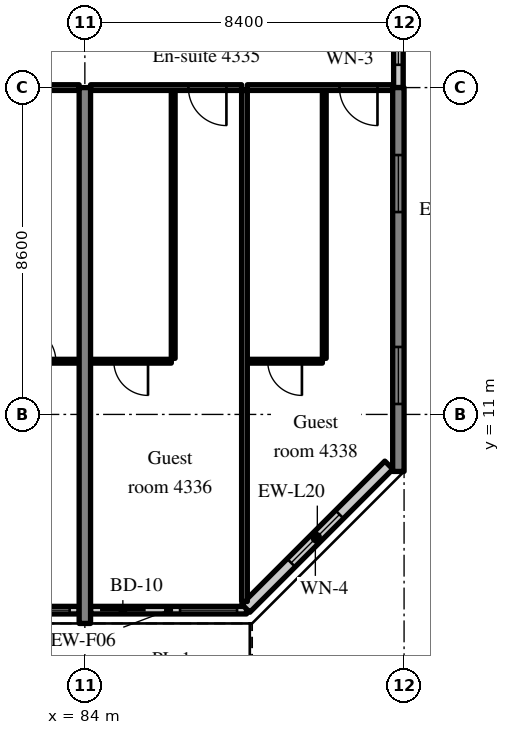
"""IFC4 building model, lengths in metres.
Left out: names, types, materials, properties, quantities, classifications, styles, units other than length and angle.
Written with IfcOpenShell. Run it as: python <this file> out.ifc"""

import sys

from ifc_helpers import new_model, si_unit, direction, frame, frame_2d, origin, place, context, subcontext, project, spatial, rectangle, extrude, source, transform, mapped, element, fill, save


model = new_model("IFC4")
c1 = context("Model", 3, precision=1e-05, world=origin(), true_north=direction((0.0, 1.0)))
c2 = subcontext(c1, "Body", "Model", "MODEL_VIEW")
j1 = project(units=[si_unit("LENGTHUNIT", "METRE"), si_unit("PLANEANGLEUNIT", "RADIAN")], contexts=[c1])
p1 = place(None, origin())
s1 = spatial("IfcSite", under=j1, at=p1, CompositionType="ELEMENT")
p2 = place(p1, origin())
s2 = spatial("IfcBuilding", under=s1, at=p2, CompositionType="ELEMENT")
p3 = place(p2, frame((0.0, 0.0, 178.2)))
s3 = spatial("IfcBuildingStorey", under=s2, at=p3, CompositionType="ELEMENT", Elevation=178.2)
m1 = source(origin(), c2, "Body", "SweptSolid", [
    extrude(rectangle(XDim=14.1, YDim=0.3, at=frame_2d((7.05, 0.0))), origin(), (0.0, 0.0, 1.0), 3.52),
])
p4 = place(p3, frame((84.0, 5.5, 0.0), z_axis=(0.0, 0.0, 1.0), x_axis=(0.0, 1.0, 0.0)))
e1 = element("IfcWall", 1, at=p4, inside=s3, PredefinedType="SHEAR", context=c2, shape_type="MappedRepresentation", body=[
    mapped(m1, transform((0.0, 0.0, 0.0), scale=1.0)),
])
m2 = source(origin(), c2, "Body", "SweptSolid", [
    extrude(rectangle(XDim=10.1, YDim=0.3, at=frame_2d((5.05, 0.0))), origin(), (0.0, 0.0, 1.0), 3.52),
])
p5 = place(p3, frame((92.25, 9.5, 0.0), z_axis=(0.0, 0.0, 1.0), x_axis=(0.0, 1.0, 0.0)))
e2 = element("IfcWall", 2, at=p5, inside=s3, PredefinedType="SHEAR", context=c2, shape_type="MappedRepresentation", body=[
    mapped(m2, transform((0.0, 0.0, 0.0), scale=1.0)),
])
m3 = source(origin(), c2, "Body", "SweptSolid", [
    extrude(rectangle(XDim=1.5, YDim=1.5, at=frame_2d((0.75, 0.75))), frame((0.0, 0.16, 0.0), z_axis=(0.0, -1.0, 0.0), x_axis=(1.0, 0.0, 0.0)), (0.0, 0.0, 1.0), 0.32),
])
p6 = place(p5, frame((1.775, 0.0, 0.9)))
e3 = element("IfcOpeningElement", 3, at=p6, cuts=e2, PredefinedType="OPENING", context=c2, shape_type="MappedRepresentation", body=[
    mapped(m3, transform((0.0, 0.0, 0.0), scale=1.0)),
])
p7 = place(p5, frame((6.825, 0.0, 0.9)))
e4 = element("IfcOpeningElement", 4, at=p7, cuts=e2, PredefinedType="OPENING", context=c2, shape_type="MappedRepresentation", body=[
    mapped(m3, transform((0.0, 0.0, 0.0), scale=1.0)),
])
m4 = source(origin(), c2, "Body", "SweptSolid", [
    extrude(rectangle(XDim=8.1, YDim=0.2, at=frame_2d((4.05, 0.0))), origin(), (0.0, 0.0, 1.0), 2.87),
])
p8 = place(p3, frame((75.75, 5.85, 0.0), z_axis=(0.0, 0.0, 1.0), x_axis=(1.0, 0.0, 0.0)))
e5 = element("IfcWall", 5, at=p8, inside=s3, PredefinedType="SOLIDWALL", context=c2, shape_type="MappedRepresentation", body=[
    mapped(m4, transform((0.0, 0.0, 0.0), scale=1.0)),
])
m5 = source(origin(), c2, "Body", "SweptSolid", [
    extrude(rectangle(XDim=1.2, YDim=2.4, at=frame_2d((0.6, 1.2))), frame((0.0, 0.11, 0.0), z_axis=(0.0, -1.0, 0.0), x_axis=(1.0, 0.0, 0.0)), (0.0, 0.0, 1.0), 0.22),
])
p9 = place(p8, frame((0.25, 0.0, 0.0)))
e6 = element("IfcOpeningElement", 6, at=p9, cuts=e5, PredefinedType="OPENING", context=c2, shape_type="MappedRepresentation", body=[
    mapped(m5, transform((0.0, 0.0, 0.0), scale=1.0)),
])
m6 = source(origin(), c2, "Body", "SweptSolid", [
    extrude(rectangle(XDim=1.5, YDim=1.5, at=frame_2d((0.75, 0.75))), frame((0.0, 0.11, 0.0), z_axis=(0.0, -1.0, 0.0), x_axis=(1.0, 0.0, 0.0)), (0.0, 0.0, 1.0), 0.22),
])
p10 = place(p8, frame((2.3, 0.0, 0.9)))
e7 = element("IfcOpeningElement", 7, at=p10, cuts=e5, PredefinedType="OPENING", context=c2, shape_type="MappedRepresentation", body=[
    mapped(m6, transform((0.0, 0.0, 0.0), scale=1.0)),
])
p11 = place(p8, frame((4.3, 0.0, 0.0)))
e8 = element("IfcOpeningElement", 8, at=p11, cuts=e5, PredefinedType="OPENING", context=c2, shape_type="MappedRepresentation", body=[
    mapped(m5, transform((0.0, 0.0, 0.0), scale=1.0)),
])
p12 = place(p8, frame((6.35, 0.0, 0.9)))
e9 = element("IfcOpeningElement", 9, at=p12, cuts=e5, PredefinedType="OPENING", context=c2, shape_type="MappedRepresentation", body=[
    mapped(m6, transform((0.0, 0.0, 0.0), scale=1.0)),
])
m7 = source(origin(), c2, "Body", "SweptSolid", [
    extrude(rectangle(XDim=4.105, YDim=0.2, at=frame_2d((2.052, 0.0))), origin(), (0.0, 0.0, 1.0), 2.87),
])
p13 = place(p3, frame((84.15, 5.85, 0.0), z_axis=(0.0, 0.0, 1.0), x_axis=(1.0, 0.0, 0.0)))
e10 = element("IfcWall", 10, at=p13, inside=s3, PredefinedType="SOLIDWALL", context=c2, shape_type="MappedRepresentation", body=[
    mapped(m7, transform((0.0, 0.0, 0.0), scale=1.0)),
])
p14 = place(p13, frame((0.25, 0.0, 0.0)))
e11 = element("IfcOpeningElement", 11, at=p14, cuts=e10, PredefinedType="OPENING", context=c2, shape_type="MappedRepresentation", body=[
    mapped(m5, transform((0.0, 0.0, 0.0), scale=1.0)),
])
p15 = place(p13, frame((2.355, 0.0, 0.9)))
e12 = element("IfcOpeningElement", 12, at=p15, cuts=e10, PredefinedType="OPENING", context=c2, shape_type="MappedRepresentation", body=[
    mapped(m6, transform((0.0, 0.0, 0.0), scale=1.0)),
])
m8 = source(origin(), c2, "Body", "SweptSolid", [
    extrude(rectangle(XDim=5.326, YDim=0.3, at=frame_2d((2.663, 0.0))), origin(), (0.0, 0.0, 1.0), 3.52),
])
p16 = place(p3, frame((88.234, 5.9, 0.0), z_axis=(0.0, 0.0, 1.0), x_axis=(0.707083859269, 0.707129702361, 0.0)))
e13 = element("IfcWall", 13, at=p16, inside=s3, PredefinedType="SOLIDWALL", context=c2, shape_type="MappedRepresentation", body=[
    mapped(m8, transform((0.0, 0.0, 0.0), scale=1.0)),
])
m9 = source(origin(), c2, "Body", "SweptSolid", [
    extrude(rectangle(XDim=1.8, YDim=1.5, at=frame_2d((0.9, 0.75))), frame((0.0, 0.16, 0.0), z_axis=(0.0, -1.0, 0.0), x_axis=(1.0, 0.0, 0.0)), (0.0, 0.0, 1.0), 0.32),
])
p17 = place(p16, frame((1.689, 0.0, 0.9)))
e14 = element("IfcOpeningElement", 14, at=p17, cuts=e13, PredefinedType="OPENING", context=c2, shape_type="MappedRepresentation", body=[
    mapped(m9, transform((0.0, 0.0, 0.0), scale=1.0)),
])
m10 = source(origin(), c2, "Body", "SweptSolid", [
    extrude(rectangle(XDim=2.4, YDim=0.25, at=frame_2d((1.2, 0.0))), origin(), (0.0, 0.0, 1.0), 2.62),
])
p18 = place(p3, frame((92.25, 19.6, 0.0), z_axis=(0.0, 0.0, 1.0), x_axis=(0.0, 1.0, 0.0)))
e15 = element("IfcWall", 15, at=p18, inside=s3, PredefinedType="SOLIDWALL", context=c2, shape_type="MappedRepresentation", body=[
    mapped(m10, transform((0.0, 0.0, 0.0), scale=1.0)),
])
m11 = source(origin(), c2, "Body", "SweptSolid", [
    extrude(rectangle(XDim=1.2, YDim=1.5, at=frame_2d((0.6, 0.75))), frame((0.0, 0.135, 0.0), z_axis=(0.0, -1.0, 0.0), x_axis=(1.0, 0.0, 0.0)), (0.0, 0.0, 1.0), 0.27),
])
p19 = place(p18, frame((0.6, 0.0, 0.9)))
e16 = element("IfcOpeningElement", 16, at=p19, cuts=e15, PredefinedType="OPENING", context=c2, shape_type="MappedRepresentation", body=[
    mapped(m11, transform((0.0, 0.0, 0.0), scale=1.0)),
])
m12 = source(origin(), c2, "Body", "SweptSolid", [
    extrude(rectangle(XDim=2.125, YDim=0.1, at=frame_2d((1.062, 0.0))), origin(), (0.0, 0.0, 1.0), 3.52),
])
p20 = place(p3, frame((81.725, 12.4, 0.0), z_axis=(0.0, 0.0, 1.0), x_axis=(1.0, 0.0, 0.0)))
e17 = element("IfcWall", 17, at=p20, inside=s3, PredefinedType="PARTITIONING", context=c2, shape_type="MappedRepresentation", body=[
    mapped(m12, transform((0.0, 0.0, 0.0), scale=1.0)),
])
m13 = source(origin(), c2, "Body", "SweptSolid", [
    extrude(rectangle(XDim=0.9, YDim=2.1, at=frame_2d((0.45, 1.05))), frame((0.0, 0.06, 0.0), z_axis=(0.0, -1.0, 0.0), x_axis=(1.0, 0.0, 0.0)), (0.0, 0.0, 1.0), 0.12),
])
p21 = place(p20, frame((0.612, 0.0, 0.0)))
e18 = element("IfcOpeningElement", 18, at=p21, cuts=e17, PredefinedType="OPENING", context=c2, shape_type="MappedRepresentation", body=[
    mapped(m13, transform((0.0, 0.0, 0.0), scale=1.0)),
])
m14 = source(origin(), c2, "Body", "SweptSolid", [
    extrude(rectangle(XDim=3.975, YDim=0.15, at=frame_2d((1.988, 0.0))), origin(), (0.0, 0.0, 1.0), 2.82),
])
p22 = place(p3, frame((79.875, 19.6, 0.0), z_axis=(0.0, 0.0, 1.0), x_axis=(1.0, 0.0, 0.0)))
e19 = element("IfcWall", 19, at=p22, inside=s3, PredefinedType="PARTITIONING", context=c2, shape_type="MappedRepresentation", body=[
    mapped(m14, transform((0.0, 0.0, 0.0), scale=1.0)),
])
m15 = source(origin(), c2, "Body", "SweptSolid", [
    extrude(rectangle(XDim=1.0, YDim=2.1, at=frame_2d((0.5, 1.05))), frame((0.0, 0.085, 0.0), z_axis=(0.0, -1.0, 0.0), x_axis=(1.0, 0.0, 0.0)), (0.0, 0.0, 1.0), 0.17),
])
p23 = place(p22, frame((0.4, 0.0, 0.0)))
e20 = element("IfcOpeningElement", 20, at=p23, cuts=e19, PredefinedType="OPENING", context=c2, shape_type="MappedRepresentation", body=[
    mapped(m15, transform((0.0, 0.0, 0.0), scale=1.0)),
])
m16 = source(origin(), c2, "Body", "SweptSolid", [
    extrude(rectangle(XDim=7.05, YDim=0.1, at=frame_2d((3.525, 0.0))), origin(), (0.0, 0.0, 1.0), 3.52),
])
p24 = place(p3, frame((86.325, 12.475, 0.0), z_axis=(0.0, 0.0, 1.0), x_axis=(0.0, 1.0, 0.0)))
e21 = element("IfcWall", 21, at=p24, inside=s3, PredefinedType="PARTITIONING", context=c2, shape_type="MappedRepresentation", body=[
    mapped(m16, transform((0.0, 0.0, 0.0), scale=1.0)),
])
p25 = place(p3, frame((84.15, 12.4, 0.0), z_axis=(0.0, 0.0, 1.0), x_axis=(1.0, 0.0, 0.0)))
e22 = element("IfcWall", 22, at=p25, inside=s3, PredefinedType="PARTITIONING", context=c2, shape_type="MappedRepresentation", body=[
    mapped(m12, transform((0.0, 0.0, 0.0), scale=1.0)),
])
p26 = place(p25, frame((0.612, 0.0, 0.0)))
e23 = element("IfcOpeningElement", 23, at=p26, cuts=e22, PredefinedType="OPENING", context=c2, shape_type="MappedRepresentation", body=[
    mapped(m13, transform((0.0, 0.0, 0.0), scale=1.0)),
])
p27 = place(p3, frame((84.15, 19.6, 0.0), z_axis=(0.0, 0.0, 1.0), x_axis=(1.0, 0.0, 0.0)))
e24 = element("IfcWall", 24, at=p27, inside=s3, PredefinedType="PARTITIONING", context=c2, shape_type="MappedRepresentation", body=[
    mapped(m14, transform((0.0, 0.0, 0.0), scale=1.0)),
])
p28 = place(p27, frame((2.575, 0.0, 0.0)))
e25 = element("IfcOpeningElement", 25, at=p28, cuts=e24, PredefinedType="OPENING", context=c2, shape_type="MappedRepresentation", body=[
    mapped(m15, transform((0.0, 0.0, 0.0), scale=1.0)),
])
p29 = place(p3, frame((90.3, 12.475, 0.0), z_axis=(0.0, 0.0, 1.0), x_axis=(0.0, 1.0, 0.0)))
e26 = element("IfcWall", 26, at=p29, inside=s3, PredefinedType="PARTITIONING", context=c2, shape_type="MappedRepresentation", body=[
    mapped(m16, transform((0.0, 0.0, 0.0), scale=1.0)),
])
m17 = source(origin(), c2, "Body", "SweptSolid", [
    extrude(rectangle(XDim=1.975, YDim=0.1, at=frame_2d((0.988, 0.0))), origin(), (0.0, 0.0, 1.0), 3.52),
])
p30 = place(p3, frame((88.275, 12.4, 0.0), z_axis=(0.0, 0.0, 1.0), x_axis=(1.0, 0.0, 0.0)))
e27 = element("IfcWall", 27, at=p30, inside=s3, PredefinedType="PARTITIONING", context=c2, shape_type="MappedRepresentation", body=[
    mapped(m17, transform((0.0, 0.0, 0.0), scale=1.0)),
])
p31 = place(p30, frame((0.537, 0.0, 0.0)))
e28 = element("IfcOpeningElement", 28, at=p31, cuts=e27, PredefinedType="OPENING", context=c2, shape_type="MappedRepresentation", body=[
    mapped(m13, transform((0.0, 0.0, 0.0), scale=1.0)),
])
m18 = source(origin(), c2, "Body", "SweptSolid", [
    extrude(rectangle(XDim=3.825, YDim=0.15, at=frame_2d((1.913, 0.0))), origin(), (0.0, 0.0, 1.0), 2.82),
])
p32 = place(p3, frame((88.275, 19.6, 0.0), z_axis=(0.0, 0.0, 1.0), x_axis=(1.0, 0.0, 0.0)))
e29 = element("IfcWall", 29, at=p32, inside=s3, PredefinedType="PARTITIONING", context=c2, shape_type="MappedRepresentation", body=[
    mapped(m18, transform((0.0, 0.0, 0.0), scale=1.0)),
])
p33 = place(p32, frame((2.425, 0.0, 0.0)))
e30 = element("IfcOpeningElement", 30, at=p33, cuts=e29, PredefinedType="OPENING", context=c2, shape_type="MappedRepresentation", body=[
    mapped(m15, transform((0.0, 0.0, 0.0), scale=1.0)),
])
m19 = source(origin(), c2, "Body", "SweptSolid", [
    extrude(rectangle(XDim=13.447, YDim=0.15, at=frame_2d((6.724, 0.0))), origin(), (0.0, 0.0, 1.0), 3.52),
])
p34 = place(p3, frame((88.2, 6.078, 0.0), z_axis=(0.0, 0.0, 1.0), x_axis=(0.0, 1.0, 0.0)))
e31 = element("IfcWall", 31, at=p34, inside=s3, PredefinedType="PARTITIONING", context=c2, shape_type="MappedRepresentation", body=[
    mapped(m19, transform((0.0, 0.0, 0.0), scale=1.0)),
])
m20 = source(origin(), c2, "Body", "SweptSolid", [
    extrude(rectangle(XDim=1.5, YDim=1.5, at=frame_2d((0.75, 0.75))), frame((0.0, 0.03, 0.0), z_axis=(0.0, -1.0, 0.0), x_axis=(1.0, 0.0, 0.0)), (0.0, 0.0, 1.0), 0.06),
])
p35 = place(p12, origin())
e32 = element("IfcWindow", 32, at=p35, inside=s3, PartitioningType="SINGLE_PANEL", PredefinedType="WINDOW", context=c2, shape_type="MappedRepresentation", body=[
    mapped(m20, transform((0.0, 0.0, 0.0), scale=1.0)),
])
fill(e9, e32)
m21 = source(origin(), c2, "Body", "SweptSolid", [
    extrude(rectangle(XDim=1.2, YDim=2.4, at=frame_2d((0.6, 1.2))), frame((0.0, 0.025, 0.0), z_axis=(0.0, -1.0, 0.0), x_axis=(1.0, 0.0, 0.0)), (0.0, 0.0, 1.0), 0.05),
])
p36 = place(p14, origin())
e33 = element("IfcDoor", 33, at=p36, inside=s3, OperationType="SLIDING_TO_RIGHT", PredefinedType="DOOR", context=c2, shape_type="MappedRepresentation", body=[
    mapped(m21, transform((0.0, 0.0, 0.0), scale=1.0)),
])
fill(e11, e33)
p37 = place(p15, origin())
e34 = element("IfcWindow", 34, at=p37, inside=s3, PartitioningType="SINGLE_PANEL", PredefinedType="WINDOW", context=c2, shape_type="MappedRepresentation", body=[
    mapped(m20, transform((0.0, 0.0, 0.0), scale=1.0)),
])
fill(e12, e34)
m22 = source(origin(), c2, "Body", "SweptSolid", [
    extrude(rectangle(XDim=1.8, YDim=1.5, at=frame_2d((0.9, 0.75))), frame((0.0, 0.03, 0.0), z_axis=(0.0, -1.0, 0.0), x_axis=(1.0, 0.0, 0.0)), (0.0, 0.0, 1.0), 0.06),
])
p38 = place(p17, origin())
e35 = element("IfcWindow", 35, at=p38, inside=s3, PartitioningType="SINGLE_PANEL", PredefinedType="WINDOW", context=c2, shape_type="MappedRepresentation", body=[
    mapped(m22, transform((0.0, 0.0, 0.0), scale=1.0)),
])
fill(e14, e35)
p39 = place(p6, origin())
e36 = element("IfcWindow", 36, at=p39, inside=s3, PartitioningType="SINGLE_PANEL", PredefinedType="WINDOW", context=c2, shape_type="MappedRepresentation", body=[
    mapped(m20, transform((0.0, 0.0, 0.0), scale=1.0)),
])
fill(e3, e36)
p40 = place(p7, origin())
e37 = element("IfcWindow", 37, at=p40, inside=s3, PartitioningType="SINGLE_PANEL", PredefinedType="WINDOW", context=c2, shape_type="MappedRepresentation", body=[
    mapped(m20, transform((0.0, 0.0, 0.0), scale=1.0)),
])
fill(e4, e37)
m23 = source(origin(), c2, "Body", "SweptSolid", [
    extrude(rectangle(XDim=1.2, YDim=1.5, at=frame_2d((0.6, 0.75))), frame((0.0, 0.03, 0.0), z_axis=(0.0, -1.0, 0.0), x_axis=(1.0, 0.0, 0.0)), (0.0, 0.0, 1.0), 0.06),
])
p41 = place(p19, origin())
e38 = element("IfcWindow", 38, at=p41, inside=s3, PartitioningType="SINGLE_PANEL", PredefinedType="WINDOW", context=c2, shape_type="MappedRepresentation", body=[
    mapped(m23, transform((0.0, 0.0, 0.0), scale=1.0)),
])
fill(e16, e38)
m24 = source(origin(), c2, "Body", "SweptSolid", [
    extrude(rectangle(XDim=0.9, YDim=2.1, at=frame_2d((0.45, 1.05))), frame((0.0, 0.025, 0.0), z_axis=(0.0, -1.0, 0.0), x_axis=(1.0, 0.0, 0.0)), (0.0, 0.0, 1.0), 0.05),
])
p42 = place(p21, origin())
e39 = element("IfcDoor", 39, at=p42, inside=s3, OperationType="SINGLE_SWING_LEFT", PredefinedType="DOOR", context=c2, shape_type="MappedRepresentation", body=[
    mapped(m24, transform((0.0, 0.0, 0.0), scale=1.0)),
])
fill(e18, e39)
p43 = place(p26, origin())
e40 = element("IfcDoor", 40, at=p43, inside=s3, OperationType="SINGLE_SWING_RIGHT", PredefinedType="DOOR", context=c2, shape_type="MappedRepresentation", body=[
    mapped(m24, transform((0.0, 0.0, 0.0), scale=1.0)),
])
fill(e23, e40)
m25 = source(origin(), c2, "Body", "SweptSolid", [
    extrude(rectangle(XDim=1.0, YDim=2.1, at=frame_2d((0.5, 1.05))), frame((0.0, 0.025, 0.0), z_axis=(0.0, -1.0, 0.0), x_axis=(1.0, 0.0, 0.0)), (0.0, 0.0, 1.0), 0.05),
])
p44 = place(p28, origin())
e41 = element("IfcDoor", 41, at=p44, inside=s3, OperationType="SINGLE_SWING_RIGHT", PredefinedType="DOOR", context=c2, shape_type="MappedRepresentation", body=[
    mapped(m25, transform((0.0, 0.0, 0.0), scale=1.0)),
])
fill(e25, e41)
p45 = place(p31, origin())
e42 = element("IfcDoor", 42, at=p45, inside=s3, OperationType="SINGLE_SWING_RIGHT", PredefinedType="DOOR", context=c2, shape_type="MappedRepresentation", body=[
    mapped(m24, transform((0.0, 0.0, 0.0), scale=1.0)),
])
fill(e28, e42)
p46 = place(p33, origin())
e43 = element("IfcDoor", 43, at=p46, inside=s3, OperationType="SINGLE_SWING_RIGHT", PredefinedType="DOOR", context=c2, shape_type="MappedRepresentation", body=[
    mapped(m25, transform((0.0, 0.0, 0.0), scale=1.0)),
])
fill(e30, e43)
save(model, sys.argv[1])
